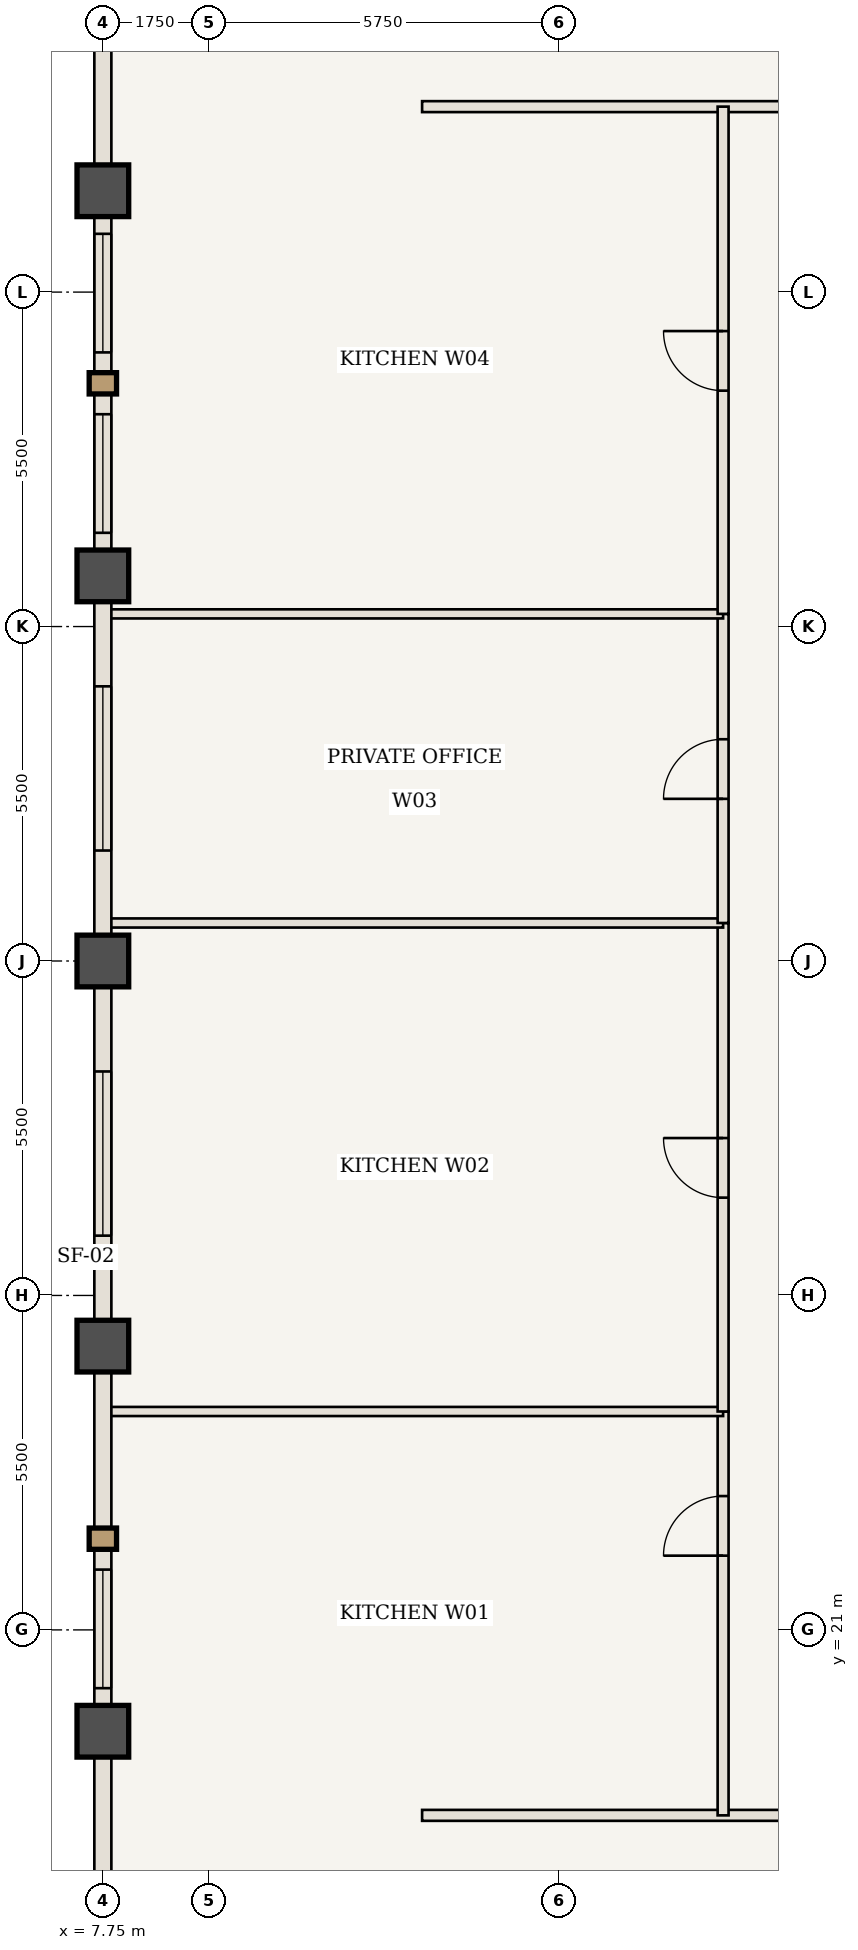
"""IFC4 building model, lengths in metres.
Left out: names, types, materials, properties, quantities, classifications, styles, units other than length and angle.
Written with IfcOpenShell. Run it as: python <this file> out.ifc"""

import sys

from ifc_helpers import new_model, si_unit, direction, frame, frame_2d, origin, origin_2d, place, context, subcontext, project, spatial, rectangle, extrude, element, fill, save


model = new_model("IFC4")
c1 = context("Model", 3, precision=1e-05, world=origin(), true_north=direction((0.0, 1.0)))
c2 = subcontext(c1, "Body", "Model", "MODEL_VIEW")
j1 = project(units=[si_unit("LENGTHUNIT", "METRE"), si_unit("PLANEANGLEUNIT", "RADIAN")], contexts=[c1])
p1 = place(None, origin())
s1 = spatial("IfcSite", under=j1, at=p1, CompositionType="ELEMENT")
p2 = place(p1, origin())
s2 = spatial("IfcBuilding", under=s1, at=p2, CompositionType="ELEMENT")
p3 = place(p2, frame((0.0, 0.0, 221.55)))
s3 = spatial("IfcBuildingStorey", under=s2, at=p3, CompositionType="ELEMENT", Elevation=221.55)
for number, where, z_axis, x_axis in (
    (1, (7.75, 19.333, 0.0), (0.0, 0.0, 1.0), (1.0, 0.0, 0.0)),
    (2, (7.75, 25.667, 0.0), (0.0, 0.0, 1.0), (1.0, 0.0, 0.0)),
    (3, (7.75, 32.0, 0.0), (0.0, 0.0, 1.0), (1.0, 0.0, 0.0)),
    (4, (7.75, 38.333, 0.0), (0.0, 0.0, 1.0), (1.0, 0.0, 0.0)),
    (5, (7.75, 44.667, 0.0), (0.0, 0.0, 1.0), (1.0, 0.0, 0.0)),
):
    element("IfcColumn", number, at=place(p3, frame(where, z_axis=z_axis, x_axis=x_axis)), inside=s3, PredefinedType="COLUMN", context=c2, shape_type="SweptSolid", body=[
        extrude(rectangle(XDim=0.85, YDim=0.85, at=origin_2d()), origin(), (0.0, 0.0, 1.0), 3.85),
    ])
p4 = place(p3, frame((13.0, 17.95, 0.0), z_axis=(0.0, 0.0, 1.0), x_axis=(1.0, 0.0, 0.0)))
e6 = element("IfcWall", 6, at=p4, inside=s3, PredefinedType="STANDARD", context=c2, shape_type="SweptSolid", body=[
    extrude(rectangle(XDim=13.292, YDim=0.18, at=frame_2d((6.646, 0.0))), origin(), (0.0, 0.0, 1.0), 3.685),
])
p5 = place(p4, frame((8.621, 0.0, 0.0)))
e7 = element("IfcOpeningElement", 7, at=p5, cuts=e6, PredefinedType="OPENING", context=c2, shape_type="SweptSolid", body=[
    extrude(rectangle(XDim=0.98, YDim=2.2, at=frame_2d((0.49, 1.1))), frame((0.0, 0.1, 0.0), z_axis=(0.0, -1.0, 0.0), x_axis=(1.0, 0.0, 0.0)), (0.0, 0.0, 1.0), 0.2),
])
p6 = place(p3, frame((13.0, 46.05, 0.0), z_axis=(0.0, 0.0, 1.0), x_axis=(1.0, 0.0, 0.0)))
e8 = element("IfcWall", 8, at=p6, inside=s3, PredefinedType="STANDARD", context=c2, shape_type="SweptSolid", body=[
    extrude(rectangle(XDim=38.0, YDim=0.18, at=frame_2d((19.0, 0.0))), origin(), (0.0, 0.0, 1.0), 3.685),
])
p7 = place(p6, frame((19.7, 0.0, 0.0)))
e9 = element("IfcOpeningElement", 9, at=p7, cuts=e8, PredefinedType="OPENING", context=c2, shape_type="SweptSolid", body=[
    extrude(rectangle(XDim=0.98, YDim=2.2, at=frame_2d((0.49, 1.1))), frame((0.0, 0.1, 0.0), z_axis=(0.0, -1.0, 0.0), x_axis=(1.0, 0.0, 0.0)), (0.0, 0.0, 1.0), 0.2),
])
p8 = place(p3, frame((17.95, 17.95, 0.0), z_axis=(0.0, 0.0, 1.0), x_axis=(0.0, 1.0, 0.0)))
e10 = element("IfcWall", 10, at=p8, inside=s3, PredefinedType="STANDARD", context=c2, shape_type="SweptSolid", body=[
    extrude(rectangle(XDim=6.642, YDim=0.18, at=frame_2d((3.321, 0.0))), origin(), (0.0, 0.0, 1.0), 3.685),
])
p9 = place(p8, frame((4.271, 0.0, 0.0)))
e11 = element("IfcOpeningElement", 11, at=p9, cuts=e10, PredefinedType="OPENING", context=c2, shape_type="SweptSolid", body=[
    extrude(rectangle(XDim=0.98, YDim=2.2, at=frame_2d((0.49, 1.1))), frame((0.0, 0.1, 0.0), z_axis=(0.0, -1.0, 0.0), x_axis=(1.0, 0.0, 0.0)), (0.0, 0.0, 1.0), 0.2),
])
p10 = place(p3, frame((7.81, 24.592, 0.0), z_axis=(0.0, 0.0, 1.0), x_axis=(1.0, 0.0, 0.0)))
e12 = element("IfcWall", 12, at=p10, inside=s3, PredefinedType="STANDARD", context=c2, shape_type="SweptSolid", body=[
    extrude(rectangle(XDim=10.14, YDim=0.15, at=frame_2d((5.07, 0.0))), origin(), (0.0, 0.0, 1.0), 3.685),
])
p11 = place(p3, frame((17.95, 24.592, 0.0), z_axis=(0.0, 0.0, 1.0), x_axis=(0.0, 1.0, 0.0)))
e13 = element("IfcWall", 13, at=p11, inside=s3, PredefinedType="STANDARD", context=c2, shape_type="SweptSolid", body=[
    extrude(rectangle(XDim=8.033, YDim=0.18, at=frame_2d((4.017, 0.0))), origin(), (0.0, 0.0, 1.0), 3.685),
])
p12 = place(p11, frame((3.517, 0.0, 0.0)))
e14 = element("IfcOpeningElement", 14, at=p12, cuts=e13, PredefinedType="OPENING", context=c2, shape_type="SweptSolid", body=[
    extrude(rectangle(XDim=0.98, YDim=2.2, at=frame_2d((0.49, 1.1))), frame((0.0, 0.1, 0.0), z_axis=(0.0, -1.0, 0.0), x_axis=(1.0, 0.0, 0.0)), (0.0, 0.0, 1.0), 0.2),
])
p13 = place(p3, frame((7.81, 32.625, 0.0), z_axis=(0.0, 0.0, 1.0), x_axis=(1.0, 0.0, 0.0)))
e15 = element("IfcWall", 15, at=p13, inside=s3, PredefinedType="STANDARD", context=c2, shape_type="SweptSolid", body=[
    extrude(rectangle(XDim=10.14, YDim=0.15, at=frame_2d((5.07, 0.0))), origin(), (0.0, 0.0, 1.0), 3.685),
])
p14 = place(p3, frame((17.95, 32.625, 0.0), z_axis=(0.0, 0.0, 1.0), x_axis=(0.0, 1.0, 0.0)))
e16 = element("IfcWall", 16, at=p14, inside=s3, PredefinedType="STANDARD", context=c2, shape_type="SweptSolid", body=[
    extrude(rectangle(XDim=5.083, YDim=0.18, at=frame_2d((2.542, 0.0))), origin(), (0.0, 0.0, 1.0), 3.685),
])
p15 = place(p14, frame((2.042, 0.0, 0.0)))
e17 = element("IfcOpeningElement", 17, at=p15, cuts=e16, PredefinedType="OPENING", context=c2, shape_type="SweptSolid", body=[
    extrude(rectangle(XDim=0.98, YDim=2.2, at=frame_2d((0.49, 1.1))), frame((0.0, 0.1, 0.0), z_axis=(0.0, -1.0, 0.0), x_axis=(1.0, 0.0, 0.0)), (0.0, 0.0, 1.0), 0.2),
])
p16 = place(p3, frame((7.81, 37.708, 0.0), z_axis=(0.0, 0.0, 1.0), x_axis=(1.0, 0.0, 0.0)))
e18 = element("IfcWall", 18, at=p16, inside=s3, PredefinedType="STANDARD", context=c2, shape_type="SweptSolid", body=[
    extrude(rectangle(XDim=10.14, YDim=0.15, at=frame_2d((5.07, 0.0))), origin(), (0.0, 0.0, 1.0), 3.685),
])
p17 = place(p3, frame((17.95, 37.708, 0.0), z_axis=(0.0, 0.0, 1.0), x_axis=(0.0, 1.0, 0.0)))
e19 = element("IfcWall", 19, at=p17, inside=s3, PredefinedType="STANDARD", context=c2, shape_type="SweptSolid", body=[
    extrude(rectangle(XDim=8.342, YDim=0.18, at=frame_2d((4.171, 0.0))), origin(), (0.0, 0.0, 1.0), 3.685),
])
p18 = place(p17, frame((3.671, 0.0, 0.0)))
e20 = element("IfcOpeningElement", 20, at=p18, cuts=e19, PredefinedType="OPENING", context=c2, shape_type="SweptSolid", body=[
    extrude(rectangle(XDim=0.98, YDim=2.2, at=frame_2d((0.49, 1.1))), frame((0.0, 0.1, 0.0), z_axis=(0.0, -1.0, 0.0), x_axis=(1.0, 0.0, 0.0)), (0.0, 0.0, 1.0), 0.2),
])
p19 = place(p3, frame((7.75, 13.0, 0.0), z_axis=(0.0, 0.0, 1.0), x_axis=(0.0, 1.0, 0.0)))
e21 = element("IfcWall", 21, at=p19, inside=s3, PredefinedType="USERDEFINED", context=c2, shape_type="SweptSolid", body=[
    extrude(rectangle(XDim=6.333, YDim=0.28, at=frame_2d((3.167, 0.0))), origin(), (0.0, 0.0, 1.0), 2.985),
])
p20 = place(p3, frame((7.75, 19.333, 0.0), z_axis=(0.0, 0.0, 1.0), x_axis=(0.0, 1.0, 0.0)))
e22 = element("IfcWall", 22, at=p20, inside=s3, PredefinedType="USERDEFINED", context=c2, shape_type="SweptSolid", body=[
    extrude(rectangle(XDim=6.333, YDim=0.28, at=frame_2d((3.167, 0.0))), origin(), (0.0, 0.0, 1.0), 2.985),
])
p21 = place(p20, frame((0.708, 0.0, 0.85)))
e23 = element("IfcOpeningElement", 23, at=p21, cuts=e22, PredefinedType="OPENING", context=c2, shape_type="SweptSolid", body=[
    extrude(rectangle(XDim=1.95, YDim=1.935, at=frame_2d((0.975, 0.968))), frame((0.0, 0.15, 0.0), z_axis=(0.0, -1.0, 0.0), x_axis=(1.0, 0.0, 0.0)), (0.0, 0.0, 1.0), 0.3),
])
p22 = place(p3, frame((7.75, 25.667, 0.0), z_axis=(0.0, 0.0, 1.0), x_axis=(0.0, 1.0, 0.0)))
e24 = element("IfcWall", 24, at=p22, inside=s3, PredefinedType="USERDEFINED", context=c2, shape_type="SweptSolid", body=[
    extrude(rectangle(XDim=6.333, YDim=0.28, at=frame_2d((3.167, 0.0))), origin(), (0.0, 0.0, 1.0), 2.985),
])
p23 = place(p22, frame((1.817, 0.0, 0.85)))
e25 = element("IfcOpeningElement", 25, at=p23, cuts=e24, PredefinedType="OPENING", context=c2, shape_type="SweptSolid", body=[
    extrude(rectangle(XDim=2.7, YDim=1.935, at=frame_2d((1.35, 0.968))), frame((0.0, 0.15, 0.0), z_axis=(0.0, -1.0, 0.0), x_axis=(1.0, 0.0, 0.0)), (0.0, 0.0, 1.0), 0.3),
])
p24 = place(p3, frame((7.75, 32.0, 0.0), z_axis=(0.0, 0.0, 1.0), x_axis=(0.0, 1.0, 0.0)))
e26 = element("IfcWall", 26, at=p24, inside=s3, PredefinedType="USERDEFINED", context=c2, shape_type="SweptSolid", body=[
    extrude(rectangle(XDim=6.333, YDim=0.28, at=frame_2d((3.167, 0.0))), origin(), (0.0, 0.0, 1.0), 2.985),
])
p25 = place(p24, frame((1.817, 0.0, 0.85)))
e27 = element("IfcOpeningElement", 27, at=p25, cuts=e26, PredefinedType="OPENING", context=c2, shape_type="SweptSolid", body=[
    extrude(rectangle(XDim=2.7, YDim=1.935, at=frame_2d((1.35, 0.968))), frame((0.0, 0.15, 0.0), z_axis=(0.0, -1.0, 0.0), x_axis=(1.0, 0.0, 0.0)), (0.0, 0.0, 1.0), 0.3),
])
p26 = place(p3, frame((7.75, 38.333, 0.0), z_axis=(0.0, 0.0, 1.0), x_axis=(0.0, 1.0, 0.0)))
e28 = element("IfcWall", 28, at=p26, inside=s3, PredefinedType="USERDEFINED", context=c2, shape_type="SweptSolid", body=[
    extrude(rectangle(XDim=6.333, YDim=0.28, at=frame_2d((3.167, 0.0))), origin(), (0.0, 0.0, 1.0), 2.985),
])
p27 = place(p26, frame((0.708, 0.0, 0.85)))
e29 = element("IfcOpeningElement", 29, at=p27, cuts=e28, PredefinedType="OPENING", context=c2, shape_type="SweptSolid", body=[
    extrude(rectangle(XDim=1.95, YDim=1.935, at=frame_2d((0.975, 0.968))), frame((0.0, 0.15, 0.0), z_axis=(0.0, -1.0, 0.0), x_axis=(1.0, 0.0, 0.0)), (0.0, 0.0, 1.0), 0.3),
])
p28 = place(p26, frame((3.675, 0.0, 0.85)))
e30 = element("IfcOpeningElement", 30, at=p28, cuts=e28, PredefinedType="OPENING", context=c2, shape_type="SweptSolid", body=[
    extrude(rectangle(XDim=1.95, YDim=1.935, at=frame_2d((0.975, 0.968))), frame((0.0, 0.15, 0.0), z_axis=(0.0, -1.0, 0.0), x_axis=(1.0, 0.0, 0.0)), (0.0, 0.0, 1.0), 0.3),
])
p29 = place(p3, frame((7.75, 44.667, 0.0), z_axis=(0.0, 0.0, 1.0), x_axis=(0.0, 1.0, 0.0)))
e31 = element("IfcWall", 31, at=p29, inside=s3, PredefinedType="USERDEFINED", context=c2, shape_type="SweptSolid", body=[
    extrude(rectangle(XDim=6.333, YDim=0.28, at=frame_2d((3.167, 0.0))), origin(), (0.0, 0.0, 1.0), 2.985),
])
p30 = place(p9, origin())
e32 = element("IfcDoor", 32, at=p30, inside=s3, OperationType="SINGLE_SWING_LEFT", PredefinedType="DOOR", context=c2, shape_type="SweptSolid", body=[
    extrude(rectangle(XDim=0.98, YDim=2.2, at=frame_2d((0.49, 1.1))), frame((0.0, 0.025, 0.0), z_axis=(0.0, -1.0, 0.0), x_axis=(1.0, 0.0, 0.0)), (0.0, 0.0, 1.0), 0.05),
])
fill(e11, e32)
p31 = place(p12, origin())
e33 = element("IfcDoor", 33, at=p31, inside=s3, OperationType="SINGLE_SWING_RIGHT", PredefinedType="DOOR", context=c2, shape_type="SweptSolid", body=[
    extrude(rectangle(XDim=0.98, YDim=2.2, at=frame_2d((0.49, 1.1))), frame((0.0, 0.025, 0.0), z_axis=(0.0, -1.0, 0.0), x_axis=(1.0, 0.0, 0.0)), (0.0, 0.0, 1.0), 0.05),
])
fill(e14, e33)
p32 = place(p15, origin())
e34 = element("IfcDoor", 34, at=p32, inside=s3, OperationType="SINGLE_SWING_LEFT", PredefinedType="DOOR", context=c2, shape_type="SweptSolid", body=[
    extrude(rectangle(XDim=0.98, YDim=2.2, at=frame_2d((0.49, 1.1))), frame((0.0, 0.025, 0.0), z_axis=(0.0, -1.0, 0.0), x_axis=(1.0, 0.0, 0.0)), (0.0, 0.0, 1.0), 0.05),
])
fill(e17, e34)
p33 = place(p18, origin())
e35 = element("IfcDoor", 35, at=p33, inside=s3, OperationType="SINGLE_SWING_RIGHT", PredefinedType="DOOR", context=c2, shape_type="SweptSolid", body=[
    extrude(rectangle(XDim=0.98, YDim=2.2, at=frame_2d((0.49, 1.1))), frame((0.0, 0.025, 0.0), z_axis=(0.0, -1.0, 0.0), x_axis=(1.0, 0.0, 0.0)), (0.0, 0.0, 1.0), 0.05),
])
fill(e20, e35)
p34 = place(p21, origin())
e36 = element("IfcWindow", 36, at=p34, inside=s3, PartitioningType="SINGLE_PANEL", PredefinedType="WINDOW", context=c2, shape_type="SweptSolid", body=[
    extrude(rectangle(XDim=1.95, YDim=1.935, at=frame_2d((0.975, 0.968))), frame((0.0, 0.03, 0.0), z_axis=(0.0, -1.0, 0.0), x_axis=(1.0, 0.0, 0.0)), (0.0, 0.0, 1.0), 0.06),
])
fill(e23, e36)
p35 = place(p23, origin())
e37 = element("IfcWindow", 37, at=p35, inside=s3, PartitioningType="SINGLE_PANEL", PredefinedType="WINDOW", context=c2, shape_type="SweptSolid", body=[
    extrude(rectangle(XDim=2.7, YDim=1.935, at=frame_2d((1.35, 0.968))), frame((0.0, 0.03, 0.0), z_axis=(0.0, -1.0, 0.0), x_axis=(1.0, 0.0, 0.0)), (0.0, 0.0, 1.0), 0.06),
])
fill(e25, e37)
p36 = place(p25, origin())
e38 = element("IfcWindow", 38, at=p36, inside=s3, PartitioningType="SINGLE_PANEL", PredefinedType="WINDOW", context=c2, shape_type="SweptSolid", body=[
    extrude(rectangle(XDim=2.7, YDim=1.935, at=frame_2d((1.35, 0.968))), frame((0.0, 0.03, 0.0), z_axis=(0.0, -1.0, 0.0), x_axis=(1.0, 0.0, 0.0)), (0.0, 0.0, 1.0), 0.06),
])
fill(e27, e38)
p37 = place(p27, origin())
e39 = element("IfcWindow", 39, at=p37, inside=s3, PartitioningType="SINGLE_PANEL", PredefinedType="WINDOW", context=c2, shape_type="SweptSolid", body=[
    extrude(rectangle(XDim=1.95, YDim=1.935, at=frame_2d((0.975, 0.968))), frame((0.0, 0.03, 0.0), z_axis=(0.0, -1.0, 0.0), x_axis=(1.0, 0.0, 0.0)), (0.0, 0.0, 1.0), 0.06),
])
fill(e29, e39)
p38 = place(p28, origin())
e40 = element("IfcWindow", 40, at=p38, inside=s3, PartitioningType="SINGLE_PANEL", PredefinedType="WINDOW", context=c2, shape_type="SweptSolid", body=[
    extrude(rectangle(XDim=1.95, YDim=1.935, at=frame_2d((0.975, 0.968))), frame((0.0, 0.03, 0.0), z_axis=(0.0, -1.0, 0.0), x_axis=(1.0, 0.0, 0.0)), (0.0, 0.0, 1.0), 0.06),
])
fill(e30, e40)
save(model, sys.argv[1])
